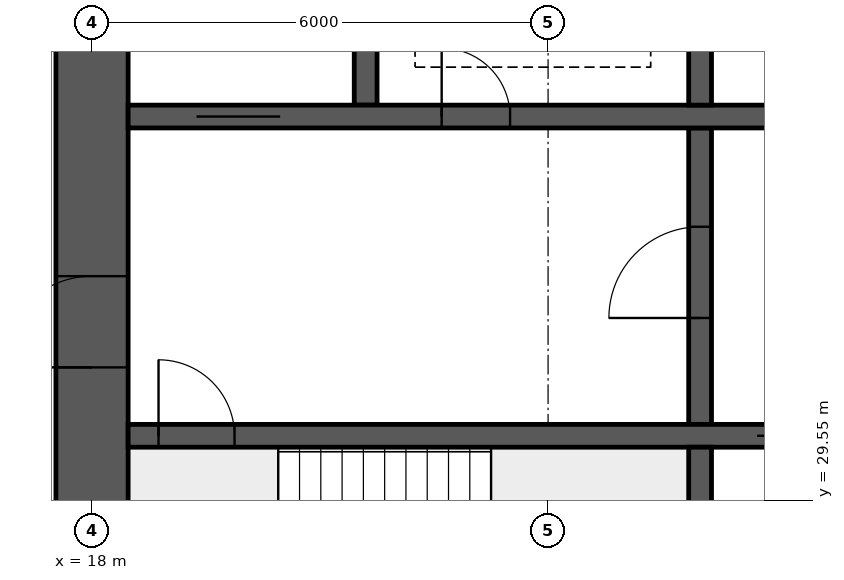
"""IFC4 building model, lengths in metres.
Left out: names, types, materials, properties, quantities, classifications, styles, units other than length and angle.
Written with IfcOpenShell. Run it as: python <this file> out.ifc"""

import sys

from ifc_helpers import new_model, si_unit, direction, frame, frame_2d, origin, place, context, subcontext, project, spatial, rectangle, extrude, element, fill, save


model = new_model("IFC4")
c1 = context("Model", 3, precision=1e-05, world=origin(), true_north=direction((0.0, 1.0)))
c2 = subcontext(c1, "Body", "Model", "MODEL_VIEW")
j1 = project(units=[si_unit("LENGTHUNIT", "METRE"), si_unit("PLANEANGLEUNIT", "RADIAN")], contexts=[c1])
p1 = place(None, origin())
s1 = spatial("IfcSite", under=j1, at=p1, CompositionType="ELEMENT")
p2 = place(p1, origin())
s2 = spatial("IfcBuilding", under=s1, at=p2, CompositionType="ELEMENT")
p3 = place(p2, frame((0.0, 0.0, 114.4)))
s3 = spatial("IfcBuildingStorey", under=s2, at=p3, CompositionType="ELEMENT", Elevation=114.4)
p4 = place(p3, frame((18.0, 26.275, 0.0), z_axis=(0.0, 0.0, 1.0), x_axis=(0.0, 1.0, 0.0)))
e1 = element("IfcWall", 1, at=p4, inside=s3, PredefinedType="SHEAR", context=c2, shape_type="SweptSolid", body=[
    extrude(rectangle(XDim=11.45, YDim=0.95, at=frame_2d((5.725, 0.0))), origin(), (0.0, 0.0, 1.0), 3.75),
])
p5 = place(p4, frame((5.025, 0.0, 0.0)))
e2 = element("IfcOpeningElement", 2, at=p5, cuts=e1, PredefinedType="OPENING", context=c2, shape_type="SweptSolid", body=[
    extrude(rectangle(XDim=1.2, YDim=2.1, at=frame_2d((0.6, 1.05))), frame((0.0, 0.485, 0.0), z_axis=(0.0, -1.0, 0.0), x_axis=(1.0, 0.0, 0.0)), (0.0, 0.0, 1.0), 0.97),
])
p6 = place(p3, frame((18.475, 30.4, 0.0), z_axis=(0.0, 0.0, 1.0), x_axis=(1.0, 0.0, 0.0)))
e3 = element("IfcWall", 3, at=p6, inside=s3, PredefinedType="SHEAR", context=c2, shape_type="SweptSolid", body=[
    extrude(rectangle(XDim=47.05, YDim=0.3, at=frame_2d((23.525, 0.0))), origin(), (0.0, 0.0, 1.0), 3.75),
])
p7 = place(p6, frame((0.4, 0.0, 0.0)))
e4 = element("IfcOpeningElement", 4, at=p7, cuts=e3, PredefinedType="OPENING", context=c2, shape_type="SweptSolid", body=[
    extrude(rectangle(XDim=1.0, YDim=2.1, at=frame_2d((0.5, 1.05))), frame((0.0, 0.16, 0.0), z_axis=(0.0, -1.0, 0.0), x_axis=(1.0, 0.0, 0.0)), (0.0, 0.0, 1.0), 0.32),
])
p8 = place(p6, frame((45.65, 0.0, 0.0)))
e5 = element("IfcOpeningElement", 5, at=p8, cuts=e3, PredefinedType="OPENING", context=c2, shape_type="SweptSolid", body=[
    extrude(rectangle(XDim=1.0, YDim=2.1, at=frame_2d((0.5, 1.05))), frame((0.0, 0.16, 0.0), z_axis=(0.0, -1.0, 0.0), x_axis=(1.0, 0.0, 0.0)), (0.0, 0.0, 1.0), 0.32),
])
p9 = place(p6, frame((8.275, 0.0, 0.0)))
e6 = element("IfcOpeningElement", 6, at=p9, cuts=e3, PredefinedType="OPENING", context=c2, shape_type="SweptSolid", body=[
    extrude(rectangle(XDim=1.1, YDim=2.1, at=frame_2d((0.55, 1.05))), frame((0.0, 0.16, 0.0), z_axis=(0.0, -1.0, 0.0), x_axis=(1.0, 0.0, 0.0)), (0.0, 0.0, 1.0), 0.32),
])
p10 = place(p6, frame((10.875, 0.0, 0.0)))
e7 = element("IfcOpeningElement", 7, at=p10, cuts=e3, PredefinedType="OPENING", context=c2, shape_type="SweptSolid", body=[
    extrude(rectangle(XDim=1.1, YDim=2.1, at=frame_2d((0.55, 1.05))), frame((0.0, 0.16, 0.0), z_axis=(0.0, -1.0, 0.0), x_axis=(1.0, 0.0, 0.0)), (0.0, 0.0, 1.0), 0.32),
])
p11 = place(p6, frame((13.475, 0.0, 0.0)))
e8 = element("IfcOpeningElement", 8, at=p11, cuts=e3, PredefinedType="OPENING", context=c2, shape_type="SweptSolid", body=[
    extrude(rectangle(XDim=1.1, YDim=2.1, at=frame_2d((0.55, 1.05))), frame((0.0, 0.16, 0.0), z_axis=(0.0, -1.0, 0.0), x_axis=(1.0, 0.0, 0.0)), (0.0, 0.0, 1.0), 0.32),
])
p12 = place(p6, frame((16.075, 0.0, 0.0)))
e9 = element("IfcOpeningElement", 9, at=p12, cuts=e3, PredefinedType="OPENING", context=c2, shape_type="SweptSolid", body=[
    extrude(rectangle(XDim=1.1, YDim=2.1, at=frame_2d((0.55, 1.05))), frame((0.0, 0.16, 0.0), z_axis=(0.0, -1.0, 0.0), x_axis=(1.0, 0.0, 0.0)), (0.0, 0.0, 1.0), 0.32),
])
p13 = place(p6, frame((18.85, 0.0, 0.0)))
e10 = element("IfcOpeningElement", 10, at=p13, cuts=e3, PredefinedType="OPENING", context=c2, shape_type="SweptSolid", body=[
    extrude(rectangle(XDim=0.9, YDim=2.1, at=frame_2d((0.45, 1.05))), frame((0.0, 0.16, 0.0), z_axis=(0.0, -1.0, 0.0), x_axis=(1.0, 0.0, 0.0)), (0.0, 0.0, 1.0), 0.32),
])
p14 = place(p6, frame((30.142, 0.0, 0.0)))
e11 = element("IfcOpeningElement", 11, at=p14, cuts=e3, PredefinedType="OPENING", context=c2, shape_type="SweptSolid", body=[
    extrude(rectangle(XDim=1.1, YDim=2.1, at=frame_2d((0.55, 1.05))), frame((0.0, 0.16, 0.0), z_axis=(0.0, -1.0, 0.0), x_axis=(1.0, 0.0, 0.0)), (0.0, 0.0, 1.0), 0.32),
])
p15 = place(p6, frame((33.675, 0.0, 0.0)))
e12 = element("IfcOpeningElement", 12, at=p15, cuts=e3, PredefinedType="OPENING", context=c2, shape_type="SweptSolid", body=[
    extrude(rectangle(XDim=1.1, YDim=2.1, at=frame_2d((0.55, 1.05))), frame((0.0, 0.16, 0.0), z_axis=(0.0, -1.0, 0.0), x_axis=(1.0, 0.0, 0.0)), (0.0, 0.0, 1.0), 0.32),
])
p16 = place(p6, frame((37.208, 0.0, 0.0)))
e13 = element("IfcOpeningElement", 13, at=p16, cuts=e3, PredefinedType="OPENING", context=c2, shape_type="SweptSolid", body=[
    extrude(rectangle(XDim=1.1, YDim=2.1, at=frame_2d((0.55, 1.05))), frame((0.0, 0.16, 0.0), z_axis=(0.0, -1.0, 0.0), x_axis=(1.0, 0.0, 0.0)), (0.0, 0.0, 1.0), 0.32),
])
p17 = place(p3, frame((18.475, 34.6, 0.0), z_axis=(0.0, 0.0, 1.0), x_axis=(1.0, 0.0, 0.0)))
e14 = element("IfcWall", 14, at=p17, inside=s3, PredefinedType="SHEAR", context=c2, shape_type="SweptSolid", body=[
    extrude(rectangle(XDim=47.05, YDim=0.3, at=frame_2d((23.525, 0.0))), origin(), (0.0, 0.0, 1.0), 3.75),
])
p18 = place(p17, frame((0.9, 0.0, 0.0)))
e15 = element("IfcOpeningElement", 15, at=p18, cuts=e14, PredefinedType="OPENING", context=c2, shape_type="SweptSolid", body=[
    extrude(rectangle(XDim=1.1, YDim=2.1, at=frame_2d((0.55, 1.05))), frame((0.0, 0.16, 0.0), z_axis=(0.0, -1.0, 0.0), x_axis=(1.0, 0.0, 0.0)), (0.0, 0.0, 1.0), 0.32),
])
p19 = place(p17, frame((45.05, 0.0, 0.0)))
e16 = element("IfcOpeningElement", 16, at=p19, cuts=e14, PredefinedType="OPENING", context=c2, shape_type="SweptSolid", body=[
    extrude(rectangle(XDim=1.1, YDim=2.1, at=frame_2d((0.55, 1.05))), frame((0.0, 0.16, 0.0), z_axis=(0.0, -1.0, 0.0), x_axis=(1.0, 0.0, 0.0)), (0.0, 0.0, 1.0), 0.32),
])
p20 = place(p17, frame((4.125, 0.0, 0.0)))
e17 = element("IfcOpeningElement", 17, at=p20, cuts=e14, PredefinedType="OPENING", context=c2, shape_type="SweptSolid", body=[
    extrude(rectangle(XDim=0.9, YDim=2.1, at=frame_2d((0.45, 1.05))), frame((0.0, 0.16, 0.0), z_axis=(0.0, -1.0, 0.0), x_axis=(1.0, 0.0, 0.0)), (0.0, 0.0, 1.0), 0.32),
])
p21 = place(p17, frame((42.025, 0.0, 0.0)))
e18 = element("IfcOpeningElement", 18, at=p21, cuts=e14, PredefinedType="OPENING", context=c2, shape_type="SweptSolid", body=[
    extrude(rectangle(XDim=0.9, YDim=2.1, at=frame_2d((0.45, 1.05))), frame((0.0, 0.16, 0.0), z_axis=(0.0, -1.0, 0.0), x_axis=(1.0, 0.0, 0.0)), (0.0, 0.0, 1.0), 0.32),
])
p22 = place(p17, frame((8.9, 0.0, 0.0)))
e19 = element("IfcOpeningElement", 19, at=p22, cuts=e14, PredefinedType="OPENING", context=c2, shape_type="SweptSolid", body=[
    extrude(rectangle(XDim=0.9, YDim=2.1, at=frame_2d((0.45, 1.05))), frame((0.0, 0.16, 0.0), z_axis=(0.0, -1.0, 0.0), x_axis=(1.0, 0.0, 0.0)), (0.0, 0.0, 1.0), 0.32),
])
p23 = place(p17, frame((12.874, 0.0, 0.0)))
e20 = element("IfcOpeningElement", 20, at=p23, cuts=e14, PredefinedType="OPENING", context=c2, shape_type="SweptSolid", body=[
    extrude(rectangle(XDim=0.9, YDim=2.1, at=frame_2d((0.45, 1.05))), frame((0.0, 0.16, 0.0), z_axis=(0.0, -1.0, 0.0), x_axis=(1.0, 0.0, 0.0)), (0.0, 0.0, 1.0), 0.32),
])
p24 = place(p17, frame((16.521, 0.0, 0.0)))
e21 = element("IfcOpeningElement", 21, at=p24, cuts=e14, PredefinedType="OPENING", context=c2, shape_type="SweptSolid", body=[
    extrude(rectangle(XDim=0.9, YDim=2.1, at=frame_2d((0.45, 1.05))), frame((0.0, 0.16, 0.0), z_axis=(0.0, -1.0, 0.0), x_axis=(1.0, 0.0, 0.0)), (0.0, 0.0, 1.0), 0.32),
])
p25 = place(p17, frame((20.28, 0.0, 0.0)))
e22 = element("IfcOpeningElement", 22, at=p25, cuts=e14, PredefinedType="OPENING", context=c2, shape_type="SweptSolid", body=[
    extrude(rectangle(XDim=0.9, YDim=2.1, at=frame_2d((0.45, 1.05))), frame((0.0, 0.16, 0.0), z_axis=(0.0, -1.0, 0.0), x_axis=(1.0, 0.0, 0.0)), (0.0, 0.0, 1.0), 0.32),
])
p26 = place(p17, frame((24.686, 0.0, 0.0)))
e23 = element("IfcOpeningElement", 23, at=p26, cuts=e14, PredefinedType="OPENING", context=c2, shape_type="SweptSolid", body=[
    extrude(rectangle(XDim=0.9, YDim=2.1, at=frame_2d((0.45, 1.05))), frame((0.0, 0.16, 0.0), z_axis=(0.0, -1.0, 0.0), x_axis=(1.0, 0.0, 0.0)), (0.0, 0.0, 1.0), 0.32),
])
p27 = place(p17, frame((27.483, 0.0, 0.0)))
e24 = element("IfcOpeningElement", 24, at=p27, cuts=e14, PredefinedType="OPENING", context=c2, shape_type="SweptSolid", body=[
    extrude(rectangle(XDim=0.9, YDim=2.1, at=frame_2d((0.45, 1.05))), frame((0.0, 0.16, 0.0), z_axis=(0.0, -1.0, 0.0), x_axis=(1.0, 0.0, 0.0)), (0.0, 0.0, 1.0), 0.32),
])
p28 = place(p17, frame((29.856, 0.0, 0.0)))
e25 = element("IfcOpeningElement", 25, at=p28, cuts=e14, PredefinedType="OPENING", context=c2, shape_type="SweptSolid", body=[
    extrude(rectangle(XDim=0.9, YDim=2.1, at=frame_2d((0.45, 1.05))), frame((0.0, 0.16, 0.0), z_axis=(0.0, -1.0, 0.0), x_axis=(1.0, 0.0, 0.0)), (0.0, 0.0, 1.0), 0.32),
])
p29 = place(p17, frame((33.706, 0.0, 0.0)))
e26 = element("IfcOpeningElement", 26, at=p29, cuts=e14, PredefinedType="OPENING", context=c2, shape_type="SweptSolid", body=[
    extrude(rectangle(XDim=0.9, YDim=2.1, at=frame_2d((0.45, 1.05))), frame((0.0, 0.16, 0.0), z_axis=(0.0, -1.0, 0.0), x_axis=(1.0, 0.0, 0.0)), (0.0, 0.0, 1.0), 0.32),
])
p30 = place(p17, frame((37.454, 0.0, 0.0)))
e27 = element("IfcOpeningElement", 27, at=p30, cuts=e14, PredefinedType="OPENING", context=c2, shape_type="SweptSolid", body=[
    extrude(rectangle(XDim=0.9, YDim=2.1, at=frame_2d((0.45, 1.05))), frame((0.0, 0.16, 0.0), z_axis=(0.0, -1.0, 0.0), x_axis=(1.0, 0.0, 0.0)), (0.0, 0.0, 1.0), 0.32),
])
p31 = place(p3, frame((26.0, 26.275, 0.0), z_axis=(0.0, 0.0, 1.0), x_axis=(0.0, 1.0, 0.0)))
e28 = element("IfcWall", 28, at=p31, inside=s3, PredefinedType="SHEAR", context=c2, shape_type="SweptSolid", body=[
    extrude(rectangle(XDim=3.975, YDim=0.3, at=frame_2d((1.988, 0.0))), origin(), (0.0, 0.0, 1.0), 3.75),
])
p32 = place(p3, frame((26.0, 30.55, 0.0), z_axis=(0.0, 0.0, 1.0), x_axis=(0.0, 1.0, 0.0)))
e29 = element("IfcWall", 29, at=p32, inside=s3, PredefinedType="SHEAR", context=c2, shape_type="SweptSolid", body=[
    extrude(rectangle(XDim=3.9, YDim=0.3, at=frame_2d((1.95, 0.0))), origin(), (0.0, 0.0, 1.0), 3.75),
])
p33 = place(p32, frame((1.4, 0.0, 0.0)))
e30 = element("IfcOpeningElement", 30, at=p33, cuts=e29, PredefinedType="OPENING", context=c2, shape_type="SweptSolid", body=[
    extrude(rectangle(XDim=1.2, YDim=2.1, at=frame_2d((0.6, 1.05))), frame((0.0, 0.16, 0.0), z_axis=(0.0, -1.0, 0.0), x_axis=(1.0, 0.0, 0.0)), (0.0, 0.0, 1.0), 0.32),
])
for number, where, z_axis, x_axis in (
    (31, (21.6, 34.75, 0.0), (0.0, 0.0, 1.0), (0.0, 1.0, 0.0)),
    (32, (26.0, 34.75, 0.0), (0.0, 0.0, 1.0), (0.0, 1.0, 0.0)),
):
    element("IfcWall", number, at=place(p3, frame(where, z_axis=z_axis, x_axis=x_axis)), inside=s3, PredefinedType="SHEAR", context=c2, shape_type="SweptSolid", body=[
        extrude(rectangle(XDim=2.975, YDim=0.3, at=frame_2d((1.488, 0.0))), origin(), (0.0, 0.0, 1.0), 3.75),
    ])
p34 = place(p5, origin())
e33 = element("IfcDoor", 33, at=p34, inside=s3, OperationType="SINGLE_SWING_LEFT", PredefinedType="DOOR", context=c2, shape_type="SweptSolid", body=[
    extrude(rectangle(XDim=1.2, YDim=2.1, at=frame_2d((0.6, 1.05))), frame((0.0, 0.025, 0.0), z_axis=(0.0, -1.0, 0.0), x_axis=(1.0, 0.0, 0.0)), (0.0, 0.0, 1.0), 0.05),
])
fill(e2, e33)
p35 = place(p7, origin())
e34 = element("IfcDoor", 34, at=p35, inside=s3, OperationType="SINGLE_SWING_LEFT", PredefinedType="DOOR", context=c2, shape_type="SweptSolid", body=[
    extrude(rectangle(XDim=1.0, YDim=2.1, at=frame_2d((0.5, 1.05))), frame((0.0, 0.025, 0.0), z_axis=(0.0, -1.0, 0.0), x_axis=(1.0, 0.0, 0.0)), (0.0, 0.0, 1.0), 0.05),
])
fill(e4, e34)
p36 = place(p18, origin())
e35 = element("IfcDoor", 35, at=p36, inside=s3, OperationType="DOUBLE_DOOR_SLIDING", PredefinedType="DOOR", context=c2, shape_type="SweptSolid", body=[
    extrude(rectangle(XDim=1.1, YDim=2.1, at=frame_2d((0.55, 1.05))), frame((0.0, 0.025, 0.0), z_axis=(0.0, -1.0, 0.0), x_axis=(1.0, 0.0, 0.0)), (0.0, 0.0, 1.0), 0.05),
])
fill(e15, e35)
p37 = place(p20, origin())
e36 = element("IfcDoor", 36, at=p37, inside=s3, OperationType="SINGLE_SWING_LEFT", PredefinedType="DOOR", context=c2, shape_type="SweptSolid", body=[
    extrude(rectangle(XDim=0.9, YDim=2.1, at=frame_2d((0.45, 1.05))), frame((0.0, 0.025, 0.0), z_axis=(0.0, -1.0, 0.0), x_axis=(1.0, 0.0, 0.0)), (0.0, 0.0, 1.0), 0.05),
])
fill(e17, e36)
p38 = place(p33, origin())
e37 = element("IfcDoor", 37, at=p38, inside=s3, OperationType="SINGLE_SWING_LEFT", PredefinedType="DOOR", context=c2, shape_type="SweptSolid", body=[
    extrude(rectangle(XDim=1.2, YDim=2.1, at=frame_2d((0.6, 1.05))), frame((0.0, 0.025, 0.0), z_axis=(0.0, -1.0, 0.0), x_axis=(1.0, 0.0, 0.0)), (0.0, 0.0, 1.0), 0.05),
])
fill(e30, e37)
p39 = place(p9, origin())
e38 = element("IfcDoor", 38, at=p39, inside=s3, OperationType="DOUBLE_DOOR_SLIDING", PredefinedType="DOOR", context=c2, shape_type="SweptSolid", body=[
    extrude(rectangle(XDim=1.1, YDim=2.1, at=frame_2d((0.55, 1.05))), frame((0.0, 0.025, 0.0), z_axis=(0.0, -1.0, 0.0), x_axis=(1.0, 0.0, 0.0)), (0.0, 0.0, 1.0), 0.05),
])
fill(e6, e38)
save(model, sys.argv[1])
